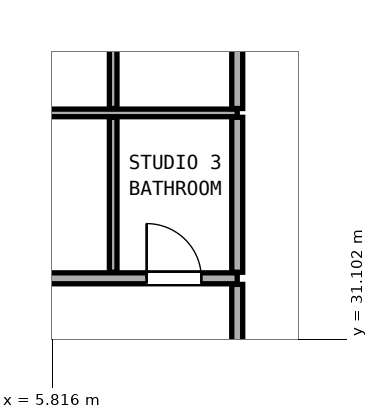
"""IFC4 building model, lengths in metres.
Left out: names, types, materials, properties, quantities, classifications, styles, units other than length and angle.
Written with IfcOpenShell. Run it as: python <this file> out.ifc"""

import sys

from ifc_helpers import new_model, si_unit, direction, frame, frame_2d, origin, place, context, subcontext, project, spatial, rectangle, extrude, element, fill, save


model = new_model("IFC4")
c1 = context("Model", 3, precision=1e-05, world=origin(), true_north=direction((0.0, 1.0)))
c2 = subcontext(c1, "Body", "Model", "MODEL_VIEW")
j1 = project(units=[si_unit("LENGTHUNIT", "METRE"), si_unit("PLANEANGLEUNIT", "RADIAN")], contexts=[c1])
p1 = place(None, origin())
s1 = spatial("IfcSite", under=j1, at=p1, CompositionType="ELEMENT")
p2 = place(p1, origin())
s2 = spatial("IfcBuilding", under=s1, at=p2, CompositionType="ELEMENT")
p3 = place(p2, frame((0.0, 0.0, 42.2)))
s3 = spatial("IfcBuildingStorey", under=s2, at=p3, CompositionType="ELEMENT", Elevation=42.2)
p4 = place(p3, frame((-2.16, 32.106, 0.0), z_axis=(0.0, 0.0, 1.0), x_axis=(1.0, 0.0, 0.0)))
e1 = element("IfcWall", 1, at=p4, inside=s3, PredefinedType="PARTITIONING", context=c2, shape_type="SweptSolid", body=[
    extrude(rectangle(XDim=11.02, YDim=0.18, at=frame_2d((5.51, 0.0))), origin(), (0.0, 0.0, 1.0), 2.125),
])
p5 = place(p4, frame((5.035, 0.0, 0.0)))
e2 = element("IfcOpeningElement", 2, at=p5, cuts=e1, PredefinedType="OPENING", context=c2, shape_type="SweptSolid", body=[
    extrude(rectangle(XDim=0.85, YDim=2.01, at=frame_2d((0.425, 1.005))), frame((0.0, 0.1, 0.0), z_axis=(0.0, -1.0, 0.0), x_axis=(1.0, 0.0, 0.0)), (0.0, 0.0, 1.0), 0.2),
])
p6 = place(p4, frame((9.53, 0.0, 0.0)))
e3 = element("IfcOpeningElement", 3, at=p6, cuts=e1, PredefinedType="OPENING", context=c2, shape_type="SweptSolid", body=[
    extrude(rectangle(XDim=0.9, YDim=2.1, at=frame_2d((0.45, 1.05))), frame((0.0, 0.1, 0.0), z_axis=(0.0, -1.0, 0.0), x_axis=(1.0, 0.0, 0.0)), (0.0, 0.0, 1.0), 0.2),
])
p7 = place(p3, frame((-2.16, 34.826, 0.0), z_axis=(0.0, 0.0, 1.0), x_axis=(1.0, 0.0, 0.0)))
e4 = element("IfcWall", 4, at=p7, inside=s3, PredefinedType="PARTITIONING", context=c2, shape_type="SweptSolid", body=[
    extrude(rectangle(XDim=11.02, YDim=0.125, at=frame_2d((5.51, 0.0))), origin(), (0.0, 0.0, 1.0), 2.125),
])
p8 = place(p3, frame((6.82, 32.206, 0.0), z_axis=(0.0, 0.0, 1.0), x_axis=(0.0, 1.0, 0.0)))
e5 = element("IfcWall", 5, at=p8, inside=s3, PredefinedType="PARTITIONING", context=c2, shape_type="SweptSolid", body=[
    extrude(rectangle(XDim=2.547, YDim=0.125, at=frame_2d((1.274, 0.0))), origin(), (0.0, 0.0, 1.0), 3.06),
])
p9 = place(p3, frame((6.82, 34.898, 0.0), z_axis=(0.0, 0.0, 1.0), x_axis=(0.0, 1.0, 0.0)))
e6 = element("IfcWall", 6, at=p9, inside=s3, PredefinedType="PARTITIONING", context=c2, shape_type="SweptSolid", body=[
    extrude(rectangle(XDim=2.548, YDim=0.125, at=frame_2d((1.274, 0.0))), origin(), (0.0, 0.0, 1.0), 2.452),
])
p10 = place(p3, frame((8.86, 28.1, 0.0), z_axis=(0.0, 0.0, 1.0), x_axis=(0.0, 1.0, 0.0)))
e7 = element("IfcWall", 7, at=p10, inside=s3, PredefinedType="PARTITIONING", context=c2, shape_type="SweptSolid", body=[
    extrude(rectangle(XDim=3.906, YDim=0.18, at=frame_2d((1.953, 0.0))), origin(), (0.0, 0.0, 1.0), 2.279),
])
p11 = place(p10, frame((1.428, 0.0, 0.0)))
e8 = element("IfcOpeningElement", 8, at=p11, cuts=e7, PredefinedType="OPENING", context=c2, shape_type="SweptSolid", body=[
    extrude(rectangle(XDim=1.05, YDim=2.2, at=frame_2d((0.525, 1.1))), frame((0.0, 0.1, 0.0), z_axis=(0.0, -1.0, 0.0), x_axis=(1.0, 0.0, 0.0)), (0.0, 0.0, 1.0), 0.2),
])
p12 = place(p3, frame((8.86, 32.206, 0.0), z_axis=(0.0, 0.0, 1.0), x_axis=(0.0, 1.0, 0.0)))
e9 = element("IfcWall", 9, at=p12, inside=s3, PredefinedType="PARTITIONING", context=c2, shape_type="SweptSolid", body=[
    extrude(rectangle(XDim=2.547, YDim=0.18, at=frame_2d((1.274, 0.0))), origin(), (0.0, 0.0, 1.0), 3.06),
])
p13 = place(p3, frame((8.86, 34.898, 0.0), z_axis=(0.0, 0.0, 1.0), x_axis=(0.0, 1.0, 0.0)))
e10 = element("IfcWall", 10, at=p13, inside=s3, PredefinedType="PARTITIONING", context=c2, shape_type="SweptSolid", body=[
    extrude(rectangle(XDim=2.548, YDim=0.18, at=frame_2d((1.274, 0.0))), origin(), (0.0, 0.0, 1.0), 2.452),
])
p14 = place(p6, origin())
e11 = element("IfcDoor", 11, at=p14, inside=s3, OperationType="SINGLE_SWING_LEFT", PredefinedType="DOOR", context=c2, shape_type="SweptSolid", body=[
    extrude(rectangle(XDim=0.9, YDim=2.1, at=frame_2d((0.45, 1.05))), frame((0.0, 0.025, 0.0), z_axis=(0.0, -1.0, 0.0), x_axis=(1.0, 0.0, 0.0)), (0.0, 0.0, 1.0), 0.05),
])
fill(e3, e11)
save(model, sys.argv[1])
